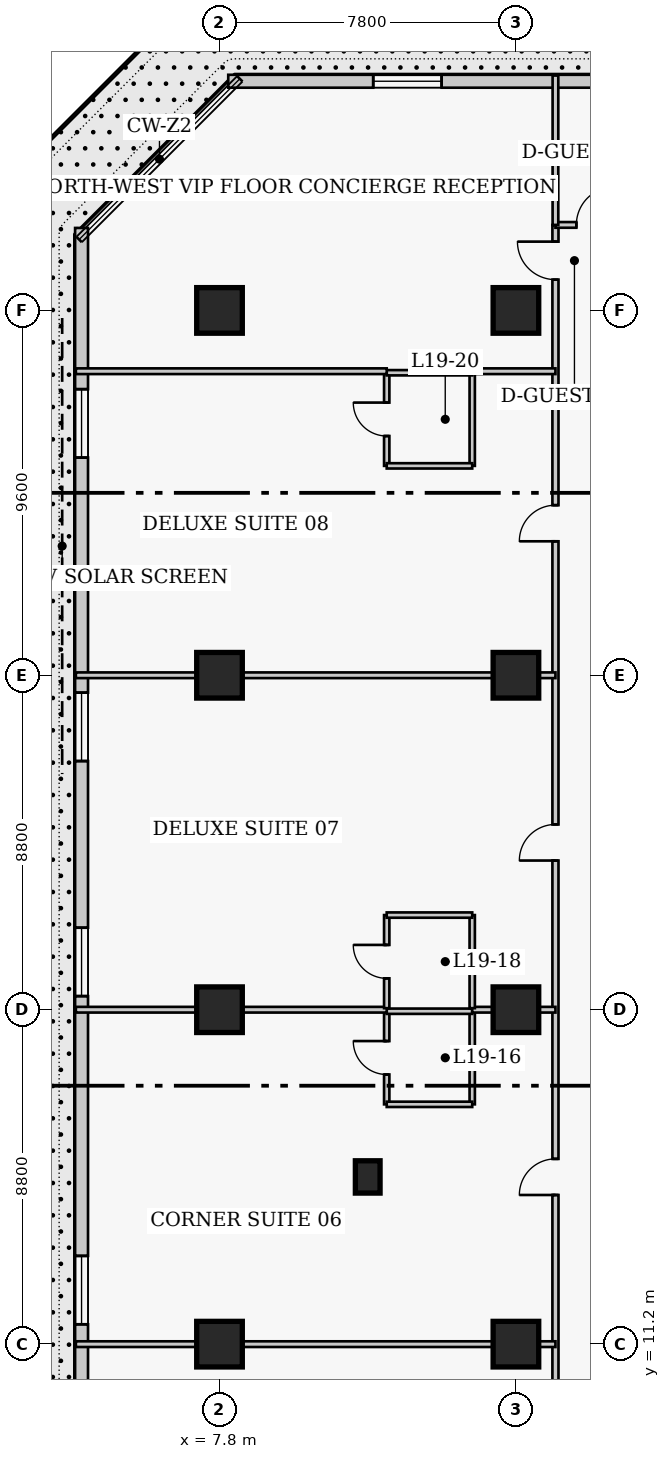
"""IFC4 building model, lengths in metres.
Left out: names, types, materials, properties, quantities, classifications, styles, units other than length and angle.
Written with IfcOpenShell. Run it as: python <this file> out.ifc"""

import sys

from ifc_helpers import new_model, si_unit, direction, frame, frame_2d, origin, origin_2d, place, context, subcontext, project, spatial, rectangle, extrude, element, fill, save


model = new_model("IFC4")
c1 = context("Model", 3, precision=1e-05, world=origin(), true_north=direction((0.0, 1.0)))
c2 = subcontext(c1, "Body", "Model", "MODEL_VIEW")
j1 = project(units=[si_unit("LENGTHUNIT", "METRE"), si_unit("PLANEANGLEUNIT", "RADIAN")], contexts=[c1])
p1 = place(None, origin())
s1 = spatial("IfcSite", under=j1, at=p1, CompositionType="ELEMENT")
p2 = place(p1, origin())
s2 = spatial("IfcBuilding", under=s1, at=p2, CompositionType="ELEMENT")
p3 = place(p2, frame((0.0, 0.0, 80.4)))
s3 = spatial("IfcBuildingStorey", under=s2, at=p3, CompositionType="ELEMENT", Elevation=80.4)
for number, where, z_axis, x_axis in (
    (1, (7.8, 11.2, 0.0), (0.0, 0.0, 1.0), (1.0, 0.0, 0.0)),
    (2, (7.8, 20.0, 0.0), (0.0, 0.0, 1.0), (1.0, 0.0, 0.0)),
    (3, (7.8, 28.8, 0.0), (0.0, 0.0, 1.0), (1.0, 0.0, 0.0)),
    (4, (7.8, 38.4, 0.0), (0.0, 0.0, 1.0), (1.0, 0.0, 0.0)),
    (5, (15.6, 11.2, 0.0), (0.0, 0.0, 1.0), (1.0, 0.0, 0.0)),
    (6, (15.6, 20.0, 0.0), (0.0, 0.0, 1.0), (1.0, 0.0, 0.0)),
    (7, (15.6, 28.8, 0.0), (0.0, 0.0, 1.0), (1.0, 0.0, 0.0)),
    (8, (15.6, 38.4, 0.0), (0.0, 0.0, 1.0), (1.0, 0.0, 0.0)),
):
    element("IfcColumn", number, at=place(p3, frame(where, z_axis=z_axis, x_axis=x_axis)), inside=s3, PredefinedType="COLUMN", context=c2, shape_type="SweptSolid", body=[
        extrude(rectangle(XDim=1.2, YDim=1.2, at=origin_2d()), origin(), (0.0, 0.0, 1.0), 3.8),
    ])
p4 = place(p3, frame((11.7, 15.6, 0.0), z_axis=(0.0, 0.0, 1.0), x_axis=(1.0, 0.0, 0.0)))
e9 = element("IfcColumn", 9, at=p4, inside=s3, PredefinedType="PILASTER", context=c2, shape_type="SweptSolid", body=[
    extrude(rectangle(XDim=0.65, YDim=0.85, at=origin_2d()), origin(), (0.0, 0.0, 1.0), 3.8),
])
p5 = place(p3, frame((36.32, 44.43, 0.0), z_axis=(0.0, 0.0, 1.0), x_axis=(-1.0, 0.0, 0.0)))
e10 = element("IfcWall", 10, at=p5, inside=s3, PredefinedType="SOLIDWALL", context=c2, shape_type="SweptSolid", body=[
    extrude(rectangle(XDim=28.29, YDim=0.34, at=frame_2d((14.145, 0.0))), origin(), (0.0, 0.0, 1.0), 3.54),
])
p6 = place(p5, frame((3.815, 0.0, 0.85)))
e11 = element("IfcOpeningElement", 11, at=p6, cuts=e10, PredefinedType="OPENING", context=c2, shape_type="SweptSolid", body=[
    extrude(rectangle(XDim=1.8, YDim=1.8, at=frame_2d((0.9, 0.9))), frame((0.0, 0.18, 0.0), z_axis=(0.0, -1.0, 0.0), x_axis=(1.0, 0.0, 0.0)), (0.0, 0.0, 1.0), 0.36),
])
p7 = place(p5, frame((13.245, 0.0, 0.85)))
e12 = element("IfcOpeningElement", 12, at=p7, cuts=e10, PredefinedType="OPENING", context=c2, shape_type="SweptSolid", body=[
    extrude(rectangle(XDim=1.8, YDim=1.8, at=frame_2d((0.9, 0.9))), frame((0.0, 0.18, 0.0), z_axis=(0.0, -1.0, 0.0), x_axis=(1.0, 0.0, 0.0)), (0.0, 0.0, 1.0), 0.36),
])
p8 = place(p5, frame((22.675, 0.0, 0.85)))
e13 = element("IfcOpeningElement", 13, at=p8, cuts=e10, PredefinedType="OPENING", context=c2, shape_type="SweptSolid", body=[
    extrude(rectangle(XDim=1.8, YDim=1.8, at=frame_2d((0.9, 0.9))), frame((0.0, 0.18, 0.0), z_axis=(0.0, -1.0, 0.0), x_axis=(1.0, 0.0, 0.0)), (0.0, 0.0, 1.0), 0.36),
])
p9 = place(p3, frame((4.17, 40.57, 0.0), z_axis=(0.0, 0.0, 1.0), x_axis=(0.0, -1.0, 0.0)))
e14 = element("IfcWall", 14, at=p9, inside=s3, PredefinedType="SOLIDWALL", context=c2, shape_type="SweptSolid", body=[
    extrude(rectangle(XDim=31.94, YDim=0.34, at=frame_2d((15.97, 0.0))), origin(), (0.0, 0.0, 1.0), 3.54),
])
p10 = place(p9, frame((4.242, 0.0, 0.85)))
e15 = element("IfcOpeningElement", 15, at=p10, cuts=e14, PredefinedType="OPENING", context=c2, shape_type="SweptSolid", body=[
    extrude(rectangle(XDim=1.8, YDim=1.8, at=frame_2d((0.9, 0.9))), frame((0.0, 0.18, 0.0), z_axis=(0.0, -1.0, 0.0), x_axis=(1.0, 0.0, 0.0)), (0.0, 0.0, 1.0), 0.36),
])
p11 = place(p9, frame((12.228, 0.0, 0.85)))
e16 = element("IfcOpeningElement", 16, at=p11, cuts=e14, PredefinedType="OPENING", context=c2, shape_type="SweptSolid", body=[
    extrude(rectangle(XDim=1.8, YDim=1.8, at=frame_2d((0.9, 0.9))), frame((0.0, 0.18, 0.0), z_axis=(0.0, -1.0, 0.0), x_axis=(1.0, 0.0, 0.0)), (0.0, 0.0, 1.0), 0.36),
])
p12 = place(p9, frame((18.413, 0.0, 0.85)))
e17 = element("IfcOpeningElement", 17, at=p12, cuts=e14, PredefinedType="OPENING", context=c2, shape_type="SweptSolid", body=[
    extrude(rectangle(XDim=1.8, YDim=1.8, at=frame_2d((0.9, 0.9))), frame((0.0, 0.18, 0.0), z_axis=(0.0, -1.0, 0.0), x_axis=(1.0, 0.0, 0.0)), (0.0, 0.0, 1.0), 0.36),
])
p13 = place(p9, frame((27.048, 0.0, 0.85)))
e18 = element("IfcOpeningElement", 18, at=p13, cuts=e14, PredefinedType="OPENING", context=c2, shape_type="SweptSolid", body=[
    extrude(rectangle(XDim=1.8, YDim=1.8, at=frame_2d((0.9, 0.9))), frame((0.0, 0.18, 0.0), z_axis=(0.0, -1.0, 0.0), x_axis=(1.0, 0.0, 0.0)), (0.0, 0.0, 1.0), 0.36),
])
p14 = place(p3, frame((16.64, 6.65, 0.0), z_axis=(0.0, 0.0, 1.0), x_axis=(0.0, 1.0, 0.0)))
e19 = element("IfcWall", 19, at=p14, inside=s3, PredefinedType="PARTITIONING", context=c2, shape_type="SweptSolid", body=[
    extrude(rectangle(XDim=34.0, YDim=0.16, at=frame_2d((17.0, 0.0))), origin(), (0.0, 0.0, 1.0), 3.54),
])
p15 = place(p14, frame((1.8, 0.0, 0.0)))
e20 = element("IfcOpeningElement", 20, at=p15, cuts=e19, PredefinedType="OPENING", context=c2, shape_type="SweptSolid", body=[
    extrude(rectangle(XDim=0.95, YDim=2.1, at=frame_2d((0.475, 1.05))), frame((0.0, 0.09, 0.0), z_axis=(0.0, -1.0, 0.0), x_axis=(1.0, 0.0, 0.0)), (0.0, 0.0, 1.0), 0.18),
])
p16 = place(p14, frame((8.475, 0.0, 0.0)))
e21 = element("IfcOpeningElement", 21, at=p16, cuts=e19, PredefinedType="OPENING", context=c2, shape_type="SweptSolid", body=[
    extrude(rectangle(XDim=0.95, YDim=2.1, at=frame_2d((0.475, 1.05))), frame((0.0, 0.09, 0.0), z_axis=(0.0, -1.0, 0.0), x_axis=(1.0, 0.0, 0.0)), (0.0, 0.0, 1.0), 0.18),
])
p17 = place(p14, frame((17.275, 0.0, 0.0)))
e22 = element("IfcOpeningElement", 22, at=p17, cuts=e19, PredefinedType="OPENING", context=c2, shape_type="SweptSolid", body=[
    extrude(rectangle(XDim=0.95, YDim=2.1, at=frame_2d((0.475, 1.05))), frame((0.0, 0.09, 0.0), z_axis=(0.0, -1.0, 0.0), x_axis=(1.0, 0.0, 0.0)), (0.0, 0.0, 1.0), 0.18),
])
p18 = place(p14, frame((25.675, 0.0, 0.0)))
e23 = element("IfcOpeningElement", 23, at=p18, cuts=e19, PredefinedType="OPENING", context=c2, shape_type="SweptSolid", body=[
    extrude(rectangle(XDim=0.95, YDim=2.1, at=frame_2d((0.475, 1.05))), frame((0.0, 0.09, 0.0), z_axis=(0.0, -1.0, 0.0), x_axis=(1.0, 0.0, 0.0)), (0.0, 0.0, 1.0), 0.18),
])
p19 = place(p14, frame((32.56, 0.0, 0.0)))
e24 = element("IfcOpeningElement", 24, at=p19, cuts=e19, PredefinedType="OPENING", context=c2, shape_type="SweptSolid", body=[
    extrude(rectangle(XDim=1.0, YDim=2.15, at=frame_2d((0.5, 1.075))), frame((0.0, 0.09, 0.0), z_axis=(0.0, -1.0, 0.0), x_axis=(1.0, 0.0, 0.0)), (0.0, 0.0, 1.0), 0.18),
])
p20 = place(p3, frame((16.64, 40.65, 0.0), z_axis=(0.0, 0.0, 1.0), x_axis=(1.0, 0.0, 0.0)))
e25 = element("IfcWall", 25, at=p20, inside=s3, PredefinedType="PARTITIONING", context=c2, shape_type="SweptSolid", body=[
    extrude(rectangle(XDim=5.46, YDim=0.15, at=frame_2d((2.73, 0.0))), origin(), (0.0, 0.0, 1.0), 3.54),
])
p21 = place(p20, frame((0.55, 0.0, 0.0)))
e26 = element("IfcOpeningElement", 26, at=p21, cuts=e25, PredefinedType="OPENING", context=c2, shape_type="SweptSolid", body=[
    extrude(rectangle(XDim=1.0, YDim=2.15, at=frame_2d((0.5, 1.075))), frame((0.0, 0.085, 0.0), z_axis=(0.0, -1.0, 0.0), x_axis=(1.0, 0.0, 0.0)), (0.0, 0.0, 1.0), 0.17),
])
p22 = place(p3, frame((16.64, 40.65, 0.0), z_axis=(0.0, 0.0, 1.0), x_axis=(0.0, 1.0, 0.0)))
e27 = element("IfcWall", 27, at=p22, inside=s3, PredefinedType="PARTITIONING", context=c2, shape_type="SweptSolid", body=[
    extrude(rectangle(XDim=3.93, YDim=0.15, at=frame_2d((1.965, 0.0))), origin(), (0.0, 0.0, 1.0), 3.54),
])
p23 = place(p3, frame((4.02, 11.2, 0.0), z_axis=(0.0, 0.0, 1.0), x_axis=(1.0, 0.0, 0.0)))
e28 = element("IfcWall", 28, at=p23, inside=s3, PredefinedType="PARTITIONING", context=c2, shape_type="SweptSolid", body=[
    extrude(rectangle(XDim=12.62, YDim=0.15, at=frame_2d((6.31, 0.0))), origin(), (0.0, 0.0, 1.0), 2.679),
])
p24 = place(p3, frame((12.2, 17.51, 0.0), z_axis=(0.0, 0.0, 1.0), x_axis=(0.0, 1.0, 0.0)))
e29 = element("IfcWall", 29, at=p24, inside=s3, PredefinedType="PLUMBINGWALL", context=c2, shape_type="SweptSolid", body=[
    extrude(rectangle(XDim=2.45, YDim=0.14, at=frame_2d((1.225, 0.0))), origin(), (0.0, 0.0, 1.0), 3.54),
])
p25 = place(p24, frame((0.785, 0.0, 0.0)))
e30 = element("IfcOpeningElement", 30, at=p25, cuts=e29, PredefinedType="OPENING", context=c2, shape_type="SweptSolid", body=[
    extrude(rectangle(XDim=0.88, YDim=2.05, at=frame_2d((0.44, 1.025))), frame((0.0, 0.08, 0.0), z_axis=(0.0, -1.0, 0.0), x_axis=(1.0, 0.0, 0.0)), (0.0, 0.0, 1.0), 0.16),
])
p26 = place(p3, frame((14.45, 17.51, 0.0), z_axis=(0.0, 0.0, 1.0), x_axis=(0.0, 1.0, 0.0)))
e31 = element("IfcWall", 31, at=p26, inside=s3, PredefinedType="PLUMBINGWALL", context=c2, shape_type="SweptSolid", body=[
    extrude(rectangle(XDim=2.45, YDim=0.14, at=frame_2d((1.225, 0.0))), origin(), (0.0, 0.0, 1.0), 3.54),
])
p27 = place(p3, frame((12.2, 17.51, 0.0), z_axis=(0.0, 0.0, 1.0), x_axis=(1.0, 0.0, 0.0)))
e32 = element("IfcWall", 32, at=p27, inside=s3, PredefinedType="PLUMBINGWALL", context=c2, shape_type="SweptSolid", body=[
    extrude(rectangle(XDim=2.25, YDim=0.14, at=frame_2d((1.125, 0.0))), origin(), (0.0, 0.0, 1.0), 3.54),
])
p28 = place(p3, frame((12.2, 19.96, 0.0), z_axis=(0.0, 0.0, 1.0), x_axis=(1.0, 0.0, 0.0)))
e33 = element("IfcWall", 33, at=p28, inside=s3, PredefinedType="PLUMBINGWALL", context=c2, shape_type="SweptSolid", body=[
    extrude(rectangle(XDim=2.25, YDim=0.14, at=frame_2d((1.125, 0.0))), origin(), (0.0, 0.0, 1.0), 2.679),
])
p29 = place(p3, frame((4.02, 20.0, 0.0), z_axis=(0.0, 0.0, 1.0), x_axis=(1.0, 0.0, 0.0)))
e34 = element("IfcWall", 34, at=p29, inside=s3, PredefinedType="PARTITIONING", context=c2, shape_type="SweptSolid", body=[
    extrude(rectangle(XDim=8.18, YDim=0.15, at=frame_2d((4.09, 0.0))), origin(), (0.0, 0.0, 1.0), 2.679),
])
p30 = place(p3, frame((14.45, 20.0, 0.0), z_axis=(0.0, 0.0, 1.0), x_axis=(1.0, 0.0, 0.0)))
e35 = element("IfcWall", 35, at=p30, inside=s3, PredefinedType="PARTITIONING", context=c2, shape_type="SweptSolid", body=[
    extrude(rectangle(XDim=2.19, YDim=0.15, at=frame_2d((1.095, 0.0))), origin(), (0.0, 0.0, 1.0), 2.679),
])
p31 = place(p3, frame((12.2, 20.04, 0.0), z_axis=(0.0, 0.0, 1.0), x_axis=(0.0, 1.0, 0.0)))
e36 = element("IfcWall", 36, at=p31, inside=s3, PredefinedType="PLUMBINGWALL", context=c2, shape_type="SweptSolid", body=[
    extrude(rectangle(XDim=2.45, YDim=0.14, at=frame_2d((1.225, 0.0))), origin(), (0.0, 0.0, 1.0), 3.54),
])
p32 = place(p31, frame((0.785, 0.0, 0.0)))
e37 = element("IfcOpeningElement", 37, at=p32, cuts=e36, PredefinedType="OPENING", context=c2, shape_type="SweptSolid", body=[
    extrude(rectangle(XDim=0.88, YDim=2.05, at=frame_2d((0.44, 1.025))), frame((0.0, 0.08, 0.0), z_axis=(0.0, -1.0, 0.0), x_axis=(1.0, 0.0, 0.0)), (0.0, 0.0, 1.0), 0.16),
])
p33 = place(p3, frame((14.45, 20.04, 0.0), z_axis=(0.0, 0.0, 1.0), x_axis=(0.0, 1.0, 0.0)))
e38 = element("IfcWall", 38, at=p33, inside=s3, PredefinedType="PLUMBINGWALL", context=c2, shape_type="SweptSolid", body=[
    extrude(rectangle(XDim=2.45, YDim=0.14, at=frame_2d((1.225, 0.0))), origin(), (0.0, 0.0, 1.0), 3.54),
])
p34 = place(p3, frame((12.2, 22.49, 0.0), z_axis=(0.0, 0.0, 1.0), x_axis=(1.0, 0.0, 0.0)))
e39 = element("IfcWall", 39, at=p34, inside=s3, PredefinedType="PLUMBINGWALL", context=c2, shape_type="SweptSolid", body=[
    extrude(rectangle(XDim=2.25, YDim=0.14, at=frame_2d((1.125, 0.0))), origin(), (0.0, 0.0, 1.0), 3.54),
])
p35 = place(p3, frame((4.02, 28.8, 0.0), z_axis=(0.0, 0.0, 1.0), x_axis=(1.0, 0.0, 0.0)))
e40 = element("IfcWall", 40, at=p35, inside=s3, PredefinedType="PARTITIONING", context=c2, shape_type="SweptSolid", body=[
    extrude(rectangle(XDim=12.62, YDim=0.15, at=frame_2d((6.31, 0.0))), origin(), (0.0, 0.0, 1.0), 2.679),
])
p36 = place(p3, frame((12.2, 34.31, 0.0), z_axis=(0.0, 0.0, 1.0), x_axis=(0.0, 1.0, 0.0)))
e41 = element("IfcWall", 41, at=p36, inside=s3, PredefinedType="PLUMBINGWALL", context=c2, shape_type="SweptSolid", body=[
    extrude(rectangle(XDim=2.45, YDim=0.14, at=frame_2d((1.225, 0.0))), origin(), (0.0, 0.0, 1.0), 3.54),
])
p37 = place(p36, frame((0.785, 0.0, 0.0)))
e42 = element("IfcOpeningElement", 42, at=p37, cuts=e41, PredefinedType="OPENING", context=c2, shape_type="SweptSolid", body=[
    extrude(rectangle(XDim=0.88, YDim=2.05, at=frame_2d((0.44, 1.025))), frame((0.0, 0.08, 0.0), z_axis=(0.0, -1.0, 0.0), x_axis=(1.0, 0.0, 0.0)), (0.0, 0.0, 1.0), 0.16),
])
p38 = place(p3, frame((14.45, 34.31, 0.0), z_axis=(0.0, 0.0, 1.0), x_axis=(0.0, 1.0, 0.0)))
e43 = element("IfcWall", 43, at=p38, inside=s3, PredefinedType="PLUMBINGWALL", context=c2, shape_type="SweptSolid", body=[
    extrude(rectangle(XDim=2.45, YDim=0.14, at=frame_2d((1.225, 0.0))), origin(), (0.0, 0.0, 1.0), 3.54),
])
for number, where, z_axis, x_axis in (
    (44, (12.2, 34.31, 0.0), (0.0, 0.0, 1.0), (1.0, 0.0, 0.0)),
    (45, (12.2, 36.76, 0.0), (0.0, 0.0, 1.0), (1.0, 0.0, 0.0)),
):
    element("IfcWall", number, at=place(p3, frame(where, z_axis=z_axis, x_axis=x_axis)), inside=s3, PredefinedType="PLUMBINGWALL", context=c2, shape_type="SweptSolid", body=[
        extrude(rectangle(XDim=2.25, YDim=0.14, at=frame_2d((1.125, 0.0))), origin(), (0.0, 0.0, 1.0), 3.54),
    ])
p39 = place(p3, frame((4.02, 36.8, 0.0), z_axis=(0.0, 0.0, 1.0), x_axis=(1.0, 0.0, 0.0)))
e46 = element("IfcWall", 46, at=p39, inside=s3, PredefinedType="PARTITIONING", context=c2, shape_type="SweptSolid", body=[
    extrude(rectangle(XDim=8.18, YDim=0.15, at=frame_2d((4.09, 0.0))), origin(), (0.0, 0.0, 1.0), 3.54),
])
p40 = place(p3, frame((14.45, 36.8, 0.0), z_axis=(0.0, 0.0, 1.0), x_axis=(1.0, 0.0, 0.0)))
e47 = element("IfcWall", 47, at=p40, inside=s3, PredefinedType="PARTITIONING", context=c2, shape_type="SweptSolid", body=[
    extrude(rectangle(XDim=2.19, YDim=0.15, at=frame_2d((1.095, 0.0))), origin(), (0.0, 0.0, 1.0), 3.54),
])
p41 = place(p8, origin())
e48 = element("IfcWindow", 48, at=p41, inside=s3, PartitioningType="SINGLE_PANEL", PredefinedType="WINDOW", context=c2, shape_type="SweptSolid", body=[
    extrude(rectangle(XDim=1.8, YDim=1.8, at=frame_2d((0.9, 0.9))), frame((0.0, 0.03, 0.0), z_axis=(0.0, -1.0, 0.0), x_axis=(1.0, 0.0, 0.0)), (0.0, 0.0, 1.0), 0.06),
])
fill(e13, e48)
p42 = place(p10, origin())
e49 = element("IfcWindow", 49, at=p42, inside=s3, PartitioningType="SINGLE_PANEL", PredefinedType="WINDOW", context=c2, shape_type="SweptSolid", body=[
    extrude(rectangle(XDim=1.8, YDim=1.8, at=frame_2d((0.9, 0.9))), frame((0.0, 0.03, 0.0), z_axis=(0.0, -1.0, 0.0), x_axis=(1.0, 0.0, 0.0)), (0.0, 0.0, 1.0), 0.06),
])
fill(e15, e49)
p43 = place(p11, origin())
e50 = element("IfcWindow", 50, at=p43, inside=s3, PartitioningType="SINGLE_PANEL", PredefinedType="WINDOW", context=c2, shape_type="SweptSolid", body=[
    extrude(rectangle(XDim=1.8, YDim=1.8, at=frame_2d((0.9, 0.9))), frame((0.0, 0.03, 0.0), z_axis=(0.0, -1.0, 0.0), x_axis=(1.0, 0.0, 0.0)), (0.0, 0.0, 1.0), 0.06),
])
fill(e16, e50)
p44 = place(p12, origin())
e51 = element("IfcWindow", 51, at=p44, inside=s3, PartitioningType="SINGLE_PANEL", PredefinedType="WINDOW", context=c2, shape_type="SweptSolid", body=[
    extrude(rectangle(XDim=1.8, YDim=1.8, at=frame_2d((0.9, 0.9))), frame((0.0, 0.03, 0.0), z_axis=(0.0, -1.0, 0.0), x_axis=(1.0, 0.0, 0.0)), (0.0, 0.0, 1.0), 0.06),
])
fill(e17, e51)
p45 = place(p13, origin())
e52 = element("IfcWindow", 52, at=p45, inside=s3, PartitioningType="SINGLE_PANEL", PredefinedType="WINDOW", context=c2, shape_type="SweptSolid", body=[
    extrude(rectangle(XDim=1.8, YDim=1.8, at=frame_2d((0.9, 0.9))), frame((0.0, 0.03, 0.0), z_axis=(0.0, -1.0, 0.0), x_axis=(1.0, 0.0, 0.0)), (0.0, 0.0, 1.0), 0.06),
])
fill(e18, e52)
p46 = place(p21, origin())
e53 = element("IfcDoor", 53, at=p46, inside=s3, OperationType="SINGLE_SWING_RIGHT", PredefinedType="DOOR", context=c2, shape_type="SweptSolid", body=[
    extrude(rectangle(XDim=1.0, YDim=2.15, at=frame_2d((0.5, 1.075))), frame((0.0, 0.025, 0.0), z_axis=(0.0, -1.0, 0.0), x_axis=(1.0, 0.0, 0.0)), (0.0, 0.0, 1.0), 0.05),
])
fill(e26, e53)
p47 = place(p25, origin())
e54 = element("IfcDoor", 54, at=p47, inside=s3, OperationType="SINGLE_SWING_RIGHT", PredefinedType="DOOR", context=c2, shape_type="SweptSolid", body=[
    extrude(rectangle(XDim=0.88, YDim=2.05, at=frame_2d((0.44, 1.025))), frame((0.0, 0.025, 0.0), z_axis=(0.0, -1.0, 0.0), x_axis=(1.0, 0.0, 0.0)), (0.0, 0.0, 1.0), 0.05),
])
fill(e30, e54)
p48 = place(p16, origin())
e55 = element("IfcDoor", 55, at=p48, inside=s3, OperationType="SINGLE_SWING_LEFT", PredefinedType="DOOR", context=c2, shape_type="SweptSolid", body=[
    extrude(rectangle(XDim=0.95, YDim=2.1, at=frame_2d((0.475, 1.05))), frame((0.0, 0.025, 0.0), z_axis=(0.0, -1.0, 0.0), x_axis=(1.0, 0.0, 0.0)), (0.0, 0.0, 1.0), 0.05),
])
fill(e21, e55)
p49 = place(p32, origin())
e56 = element("IfcDoor", 56, at=p49, inside=s3, OperationType="SINGLE_SWING_RIGHT", PredefinedType="DOOR", context=c2, shape_type="SweptSolid", body=[
    extrude(rectangle(XDim=0.88, YDim=2.05, at=frame_2d((0.44, 1.025))), frame((0.0, 0.025, 0.0), z_axis=(0.0, -1.0, 0.0), x_axis=(1.0, 0.0, 0.0)), (0.0, 0.0, 1.0), 0.05),
])
fill(e37, e56)
p50 = place(p17, origin())
e57 = element("IfcDoor", 57, at=p50, inside=s3, OperationType="SINGLE_SWING_LEFT", PredefinedType="DOOR", context=c2, shape_type="SweptSolid", body=[
    extrude(rectangle(XDim=0.95, YDim=2.1, at=frame_2d((0.475, 1.05))), frame((0.0, 0.025, 0.0), z_axis=(0.0, -1.0, 0.0), x_axis=(1.0, 0.0, 0.0)), (0.0, 0.0, 1.0), 0.05),
])
fill(e22, e57)
p51 = place(p37, origin())
e58 = element("IfcDoor", 58, at=p51, inside=s3, OperationType="SINGLE_SWING_RIGHT", PredefinedType="DOOR", context=c2, shape_type="SweptSolid", body=[
    extrude(rectangle(XDim=0.88, YDim=2.05, at=frame_2d((0.44, 1.025))), frame((0.0, 0.025, 0.0), z_axis=(0.0, -1.0, 0.0), x_axis=(1.0, 0.0, 0.0)), (0.0, 0.0, 1.0), 0.05),
])
fill(e42, e58)
p52 = place(p18, origin())
e59 = element("IfcDoor", 59, at=p52, inside=s3, OperationType="SINGLE_SWING_LEFT", PredefinedType="DOOR", context=c2, shape_type="SweptSolid", body=[
    extrude(rectangle(XDim=0.95, YDim=2.1, at=frame_2d((0.475, 1.05))), frame((0.0, 0.025, 0.0), z_axis=(0.0, -1.0, 0.0), x_axis=(1.0, 0.0, 0.0)), (0.0, 0.0, 1.0), 0.05),
])
fill(e23, e59)
p53 = place(p19, origin())
e60 = element("IfcDoor", 60, at=p53, inside=s3, OperationType="SINGLE_SWING_RIGHT", PredefinedType="DOOR", context=c2, shape_type="SweptSolid", body=[
    extrude(rectangle(XDim=1.0, YDim=2.15, at=frame_2d((0.5, 1.075))), frame((0.0, 0.025, 0.0), z_axis=(0.0, -1.0, 0.0), x_axis=(1.0, 0.0, 0.0)), (0.0, 0.0, 1.0), 0.05),
])
fill(e24, e60)
save(model, sys.argv[1])
